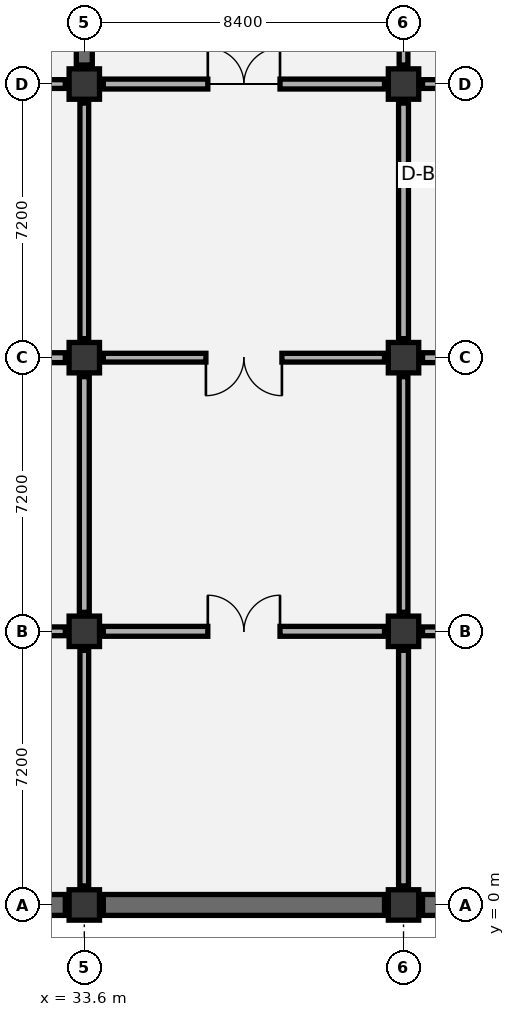
"""IFC4 building model, lengths in metres.
Left out: names, types, materials, properties, quantities, classifications, styles, units other than length and angle.
Written with IfcOpenShell. Run it as: python <this file> out.ifc"""

import sys

from ifc_helpers import new_model, si_unit, direction, frame, frame_2d, origin, origin_2d, place, context, subcontext, project, spatial, rectangle, extrude, element, fill, save


model = new_model("IFC4")
c1 = context("Model", 3, precision=1e-05, world=origin(), true_north=direction((0.0, 1.0)))
c2 = subcontext(c1, "Body", "Model", "MODEL_VIEW")
j1 = project(units=[si_unit("LENGTHUNIT", "METRE"), si_unit("PLANEANGLEUNIT", "RADIAN")], contexts=[c1])
p1 = place(None, origin())
s1 = spatial("IfcSite", under=j1, at=p1, CompositionType="ELEMENT")
p2 = place(p1, origin())
s2 = spatial("IfcBuilding", under=s1, at=p2, CompositionType="ELEMENT")
p3 = place(p2, frame((0.0, 0.0, -9.6)))
s3 = spatial("IfcBuildingStorey", under=s2, at=p3, CompositionType="ELEMENT", Elevation=-9.6)
for number, where, z_axis, x_axis in (
    (1, (33.6, 0.0, 0.0), (0.0, 0.0, 1.0), (1.0, 0.0, 0.0)),
    (2, (33.6, 7.2, 0.0), (0.0, 0.0, 1.0), (1.0, 0.0, 0.0)),
    (3, (33.6, 14.4, 0.0), (0.0, 0.0, 1.0), (1.0, 0.0, 0.0)),
    (4, (33.6, 21.6, 0.0), (0.0, 0.0, 1.0), (1.0, 0.0, 0.0)),
    (5, (42.0, 0.0, 0.0), (0.0, 0.0, 1.0), (1.0, 0.0, 0.0)),
    (6, (42.0, 7.2, 0.0), (0.0, 0.0, 1.0), (1.0, 0.0, 0.0)),
    (7, (42.0, 14.4, 0.0), (0.0, 0.0, 1.0), (1.0, 0.0, 0.0)),
    (8, (42.0, 21.6, 0.0), (0.0, 0.0, 1.0), (1.0, 0.0, 0.0)),
):
    element("IfcColumn", number, at=place(p3, frame(where, z_axis=z_axis, x_axis=x_axis)), inside=s3, PredefinedType="COLUMN", context=c2, shape_type="SweptSolid", body=[
        extrude(rectangle(XDim=0.8, YDim=0.8, at=origin_2d()), origin(), (0.0, 0.0, 1.0), 4.8),
    ])
p4 = place(p3, frame((25.7, 0.0, 0.0), z_axis=(0.0, 0.0, 1.0), x_axis=(1.0, 0.0, 0.0)))
e9 = element("IfcWall", 9, at=p4, inside=s3, PredefinedType="USERDEFINED", context=c2, shape_type="SweptSolid", body=[
    extrude(rectangle(XDim=7.4, YDim=0.55, at=frame_2d((3.7, 0.0))), origin(), (0.0, 0.0, 1.0), 4.4),
])
for number, where, z_axis, x_axis in (
    (10, (34.1, 0.0, 0.0), (0.0, 0.0, 1.0), (1.0, 0.0, 0.0)),
    (11, (42.5, 0.0, 0.0), (0.0, 0.0, 1.0), (1.0, 0.0, 0.0)),
):
    element("IfcWall", number, at=place(p3, frame(where, z_axis=z_axis, x_axis=x_axis)), inside=s3, PredefinedType="USERDEFINED", context=c2, shape_type="SweptSolid", body=[
        extrude(rectangle(XDim=7.4, YDim=0.55, at=frame_2d((3.7, 0.0))), origin(), (0.0, 0.0, 1.0), 4.4),
    ])
p5 = place(p3, frame((33.6, 22.1, 0.0), z_axis=(0.0, 0.0, 1.0), x_axis=(0.0, 1.0, 0.0)))
e12 = element("IfcWall", 12, at=p5, inside=s3, PredefinedType="SHEAR", context=c2, shape_type="SweptSolid", body=[
    extrude(rectangle(XDim=13.4, YDim=0.42, at=frame_2d((6.7, 0.0))), origin(), (0.0, 0.0, 1.0), 3.9),
])
p6 = place(p3, frame((42.15, 19.2, 0.0), z_axis=(0.0, 0.0, 1.0), x_axis=(1.0, 0.0, 0.0)))
e13 = element("IfcWall", 13, at=p6, inside=s3, PredefinedType="PARTITIONING", context=c2, shape_type="SweptSolid", body=[
    extrude(rectangle(XDim=8.1, YDim=0.12, at=frame_2d((4.05, 0.0))), origin(), (0.0, 0.0, 1.0), 4.4),
])
p7 = place(p6, frame((1.08, 0.0, 0.0)))
e14 = element("IfcOpeningElement", 14, at=p7, cuts=e13, PredefinedType="OPENING", context=c2, shape_type="SweptSolid", body=[
    extrude(rectangle(XDim=0.95, YDim=2.1, at=frame_2d((0.475, 1.05))), frame((0.0, 0.07, 0.0), z_axis=(0.0, -1.0, 0.0), x_axis=(1.0, 0.0, 0.0)), (0.0, 0.0, 1.0), 0.14),
])
p8 = place(p6, frame((3.63, 0.0, 0.0)))
e15 = element("IfcOpeningElement", 15, at=p8, cuts=e13, PredefinedType="OPENING", context=c2, shape_type="SweptSolid", body=[
    extrude(rectangle(XDim=0.9, YDim=2.1, at=frame_2d((0.45, 1.05))), frame((0.0, 0.07, 0.0), z_axis=(0.0, -1.0, 0.0), x_axis=(1.0, 0.0, 0.0)), (0.0, 0.0, 1.0), 0.14),
])
p9 = place(p6, frame((6.13, 0.0, 0.0)))
e16 = element("IfcOpeningElement", 16, at=p9, cuts=e13, PredefinedType="OPENING", context=c2, shape_type="SweptSolid", body=[
    extrude(rectangle(XDim=1.0, YDim=2.1, at=frame_2d((0.5, 1.05))), frame((0.0, 0.07, 0.0), z_axis=(0.0, -1.0, 0.0), x_axis=(1.0, 0.0, 0.0)), (0.0, 0.0, 1.0), 0.14),
])
p10 = place(p3, frame((33.6, 0.5, 0.0), z_axis=(0.0, 0.0, 1.0), x_axis=(0.0, 1.0, 0.0)))
e17 = element("IfcWall", 17, at=p10, inside=s3, PredefinedType="PARTITIONING", context=c2, shape_type="SweptSolid", body=[
    extrude(rectangle(XDim=6.2, YDim=0.23, at=frame_2d((3.1, 0.0))), origin(), (0.0, 0.0, 1.0), 3.595),
])
p11 = place(p3, frame((25.7, 7.2, 0.0), z_axis=(0.0, 0.0, 1.0), x_axis=(1.0, 0.0, 0.0)))
e18 = element("IfcWall", 18, at=p11, inside=s3, PredefinedType="PARTITIONING", context=c2, shape_type="SweptSolid", body=[
    extrude(rectangle(XDim=7.4, YDim=0.23, at=frame_2d((3.7, 0.0))), origin(), (0.0, 0.0, 1.0), 3.495),
])
p12 = place(p11, frame((2.7, 0.0, 0.0)))
e19 = element("IfcOpeningElement", 19, at=p12, cuts=e18, PredefinedType="OPENING", context=c2, shape_type="SweptSolid", body=[
    extrude(rectangle(XDim=2.0, YDim=2.35, at=frame_2d((1.0, 1.175))), frame((0.0, 0.125, 0.0), z_axis=(0.0, -1.0, 0.0), x_axis=(1.0, 0.0, 0.0)), (0.0, 0.0, 1.0), 0.25),
])
p13 = place(p3, frame((33.6, 7.7, 0.0), z_axis=(0.0, 0.0, 1.0), x_axis=(0.0, 1.0, 0.0)))
e20 = element("IfcWall", 20, at=p13, inside=s3, PredefinedType="PARTITIONING", context=c2, shape_type="SweptSolid", body=[
    extrude(rectangle(XDim=6.2, YDim=0.26, at=frame_2d((3.1, 0.0))), origin(), (0.0, 0.0, 1.0), 3.595),
])
p14 = place(p3, frame((25.7, 14.4, 0.0), z_axis=(0.0, 0.0, 1.0), x_axis=(1.0, 0.0, 0.0)))
e21 = element("IfcWall", 21, at=p14, inside=s3, PredefinedType="PARTITIONING", context=c2, shape_type="SweptSolid", body=[
    extrude(rectangle(XDim=7.4, YDim=0.26, at=frame_2d((3.7, 0.0))), origin(), (0.0, 0.0, 1.0), 3.495),
])
p15 = place(p14, frame((2.75, 0.0, 0.0)))
e22 = element("IfcOpeningElement", 22, at=p15, cuts=e21, PredefinedType="OPENING", context=c2, shape_type="SweptSolid", body=[
    extrude(rectangle(XDim=1.9, YDim=2.3, at=frame_2d((0.95, 1.15))), frame((0.0, 0.14, 0.0), z_axis=(0.0, -1.0, 0.0), x_axis=(1.0, 0.0, 0.0)), (0.0, 0.0, 1.0), 0.28),
])
p16 = place(p3, frame((33.6, 14.9, 0.0), z_axis=(0.0, 0.0, 1.0), x_axis=(0.0, 1.0, 0.0)))
e23 = element("IfcWall", 23, at=p16, inside=s3, PredefinedType="PARTITIONING", context=c2, shape_type="SweptSolid", body=[
    extrude(rectangle(XDim=6.2, YDim=0.23, at=frame_2d((3.1, 0.0))), origin(), (0.0, 0.0, 1.0), 3.595),
])
p17 = place(p3, frame((25.7, 21.6, 0.0), z_axis=(0.0, 0.0, 1.0), x_axis=(1.0, 0.0, 0.0)))
e24 = element("IfcWall", 24, at=p17, inside=s3, PredefinedType="PARTITIONING", context=c2, shape_type="SweptSolid", body=[
    extrude(rectangle(XDim=7.4, YDim=0.23, at=frame_2d((3.7, 0.0))), origin(), (0.0, 0.0, 1.0), 2.995),
])
p18 = place(p17, frame((2.7, 0.0, 0.0)))
e25 = element("IfcOpeningElement", 25, at=p18, cuts=e24, PredefinedType="OPENING", context=c2, shape_type="SweptSolid", body=[
    extrude(rectangle(XDim=2.0, YDim=2.35, at=frame_2d((1.0, 1.175))), frame((0.0, 0.125, 0.0), z_axis=(0.0, -1.0, 0.0), x_axis=(1.0, 0.0, 0.0)), (0.0, 0.0, 1.0), 0.25),
])
p19 = place(p3, frame((42.0, 0.5, 0.0), z_axis=(0.0, 0.0, 1.0), x_axis=(0.0, 1.0, 0.0)))
e26 = element("IfcWall", 26, at=p19, inside=s3, PredefinedType="PARTITIONING", context=c2, shape_type="SweptSolid", body=[
    extrude(rectangle(XDim=6.2, YDim=0.26, at=frame_2d((3.1, 0.0))), origin(), (0.0, 0.0, 1.0), 3.595),
])
p20 = place(p3, frame((34.1, 7.2, 0.0), z_axis=(0.0, 0.0, 1.0), x_axis=(1.0, 0.0, 0.0)))
e27 = element("IfcWall", 27, at=p20, inside=s3, PredefinedType="PARTITIONING", context=c2, shape_type="SweptSolid", body=[
    extrude(rectangle(XDim=7.4, YDim=0.26, at=frame_2d((3.7, 0.0))), origin(), (0.0, 0.0, 1.0), 3.495),
])
p21 = place(p20, frame((2.75, 0.0, 0.0)))
e28 = element("IfcOpeningElement", 28, at=p21, cuts=e27, PredefinedType="OPENING", context=c2, shape_type="SweptSolid", body=[
    extrude(rectangle(XDim=1.9, YDim=2.3, at=frame_2d((0.95, 1.15))), frame((0.0, 0.14, 0.0), z_axis=(0.0, -1.0, 0.0), x_axis=(1.0, 0.0, 0.0)), (0.0, 0.0, 1.0), 0.28),
])
p22 = place(p3, frame((42.0, 7.7, 0.0), z_axis=(0.0, 0.0, 1.0), x_axis=(0.0, 1.0, 0.0)))
e29 = element("IfcWall", 29, at=p22, inside=s3, PredefinedType="PARTITIONING", context=c2, shape_type="SweptSolid", body=[
    extrude(rectangle(XDim=6.2, YDim=0.23, at=frame_2d((3.1, 0.0))), origin(), (0.0, 0.0, 1.0), 3.595),
])
p23 = place(p3, frame((34.1, 14.4, 0.0), z_axis=(0.0, 0.0, 1.0), x_axis=(1.0, 0.0, 0.0)))
e30 = element("IfcWall", 30, at=p23, inside=s3, PredefinedType="PARTITIONING", context=c2, shape_type="SweptSolid", body=[
    extrude(rectangle(XDim=7.4, YDim=0.23, at=frame_2d((3.7, 0.0))), origin(), (0.0, 0.0, 1.0), 3.495),
])
p24 = place(p23, frame((2.7, 0.0, 0.0)))
e31 = element("IfcOpeningElement", 31, at=p24, cuts=e30, PredefinedType="OPENING", context=c2, shape_type="SweptSolid", body=[
    extrude(rectangle(XDim=2.0, YDim=2.35, at=frame_2d((1.0, 1.175))), frame((0.0, 0.125, 0.0), z_axis=(0.0, -1.0, 0.0), x_axis=(1.0, 0.0, 0.0)), (0.0, 0.0, 1.0), 0.25),
])
p25 = place(p3, frame((42.0, 14.9, 0.0), z_axis=(0.0, 0.0, 1.0), x_axis=(0.0, 1.0, 0.0)))
e32 = element("IfcWall", 32, at=p25, inside=s3, PredefinedType="PARTITIONING", context=c2, shape_type="SweptSolid", body=[
    extrude(rectangle(XDim=6.2, YDim=0.26, at=frame_2d((3.1, 0.0))), origin(), (0.0, 0.0, 1.0), 3.595),
])
p26 = place(p3, frame((34.1, 21.6, 0.0), z_axis=(0.0, 0.0, 1.0), x_axis=(1.0, 0.0, 0.0)))
e33 = element("IfcWall", 33, at=p26, inside=s3, PredefinedType="PARTITIONING", context=c2, shape_type="SweptSolid", body=[
    extrude(rectangle(XDim=7.4, YDim=0.26, at=frame_2d((3.7, 0.0))), origin(), (0.0, 0.0, 1.0), 2.995),
])
p27 = place(p26, frame((2.75, 0.0, 0.0)))
e34 = element("IfcOpeningElement", 34, at=p27, cuts=e33, PredefinedType="OPENING", context=c2, shape_type="SweptSolid", body=[
    extrude(rectangle(XDim=1.9, YDim=2.3, at=frame_2d((0.95, 1.15))), frame((0.0, 0.14, 0.0), z_axis=(0.0, -1.0, 0.0), x_axis=(1.0, 0.0, 0.0)), (0.0, 0.0, 1.0), 0.28),
])
p28 = place(p3, frame((42.0, 22.1, 0.0), z_axis=(0.0, 0.0, 1.0), x_axis=(0.0, 1.0, 0.0)))
e35 = element("IfcWall", 35, at=p28, inside=s3, PredefinedType="PARTITIONING", context=c2, shape_type="SweptSolid", body=[
    extrude(rectangle(XDim=6.2, YDim=0.23, at=frame_2d((3.1, 0.0))), origin(), (0.0, 0.0, 1.0), 3.095),
])
p29 = place(p3, frame((42.5, 7.2, 0.0), z_axis=(0.0, 0.0, 1.0), x_axis=(1.0, 0.0, 0.0)))
e36 = element("IfcWall", 36, at=p29, inside=s3, PredefinedType="PARTITIONING", context=c2, shape_type="SweptSolid", body=[
    extrude(rectangle(XDim=7.4, YDim=0.23, at=frame_2d((3.7, 0.0))), origin(), (0.0, 0.0, 1.0), 3.495),
])
p30 = place(p29, frame((2.75, 0.0, 0.0)))
e37 = element("IfcOpeningElement", 37, at=p30, cuts=e36, PredefinedType="OPENING", context=c2, shape_type="SweptSolid", body=[
    extrude(rectangle(XDim=1.9, YDim=2.3, at=frame_2d((0.95, 1.15))), frame((0.0, 0.125, 0.0), z_axis=(0.0, -1.0, 0.0), x_axis=(1.0, 0.0, 0.0)), (0.0, 0.0, 1.0), 0.25),
])
p31 = place(p3, frame((42.5, 14.4, 0.0), z_axis=(0.0, 0.0, 1.0), x_axis=(1.0, 0.0, 0.0)))
e38 = element("IfcWall", 38, at=p31, inside=s3, PredefinedType="PARTITIONING", context=c2, shape_type="SweptSolid", body=[
    extrude(rectangle(XDim=7.4, YDim=0.26, at=frame_2d((3.7, 0.0))), origin(), (0.0, 0.0, 1.0), 3.495),
])
p32 = place(p3, frame((42.5, 21.6, 0.0), z_axis=(0.0, 0.0, 1.0), x_axis=(1.0, 0.0, 0.0)))
e39 = element("IfcWall", 39, at=p32, inside=s3, PredefinedType="PARTITIONING", context=c2, shape_type="SweptSolid", body=[
    extrude(rectangle(XDim=7.4, YDim=0.23, at=frame_2d((3.7, 0.0))), origin(), (0.0, 0.0, 1.0), 3.495),
])
p33 = place(p32, frame((2.75, 0.0, 0.0)))
e40 = element("IfcOpeningElement", 40, at=p33, cuts=e39, PredefinedType="OPENING", context=c2, shape_type="SweptSolid", body=[
    extrude(rectangle(XDim=1.9, YDim=2.3, at=frame_2d((0.95, 1.15))), frame((0.0, 0.125, 0.0), z_axis=(0.0, -1.0, 0.0), x_axis=(1.0, 0.0, 0.0)), (0.0, 0.0, 1.0), 0.25),
])
p34 = place(p21, origin())
e41 = element("IfcDoor", 41, at=p34, inside=s3, OperationType="DOUBLE_DOOR_SINGLE_SWING", PredefinedType="DOOR", context=c2, shape_type="SweptSolid", body=[
    extrude(rectangle(XDim=1.9, YDim=2.3, at=frame_2d((0.95, 1.15))), frame((0.0, 0.025, 0.0), z_axis=(0.0, -1.0, 0.0), x_axis=(1.0, 0.0, 0.0)), (0.0, 0.0, 1.0), 0.05),
])
fill(e28, e41)
p35 = place(p24, frame((2.0, 0.0, 0.0), z_axis=(0.0, 0.0, 1.0), x_axis=(-1.0, 0.0, 0.0)))
e42 = element("IfcDoor", 42, at=p35, inside=s3, OperationType="DOUBLE_DOOR_SINGLE_SWING", PredefinedType="DOOR", context=c2, shape_type="SweptSolid", body=[
    extrude(rectangle(XDim=2.0, YDim=2.35, at=frame_2d((1.0, 1.175))), frame((0.0, 0.025, 0.0), z_axis=(0.0, -1.0, 0.0), x_axis=(1.0, 0.0, 0.0)), (0.0, 0.0, 1.0), 0.05),
])
fill(e31, e42)
p36 = place(p27, origin())
e43 = element("IfcDoor", 43, at=p36, inside=s3, OperationType="DOUBLE_DOOR_SINGLE_SWING", PredefinedType="DOOR", context=c2, shape_type="SweptSolid", body=[
    extrude(rectangle(XDim=1.9, YDim=2.3, at=frame_2d((0.95, 1.15))), frame((0.0, 0.025, 0.0), z_axis=(0.0, -1.0, 0.0), x_axis=(1.0, 0.0, 0.0)), (0.0, 0.0, 1.0), 0.05),
])
fill(e34, e43)
save(model, sys.argv[1])
